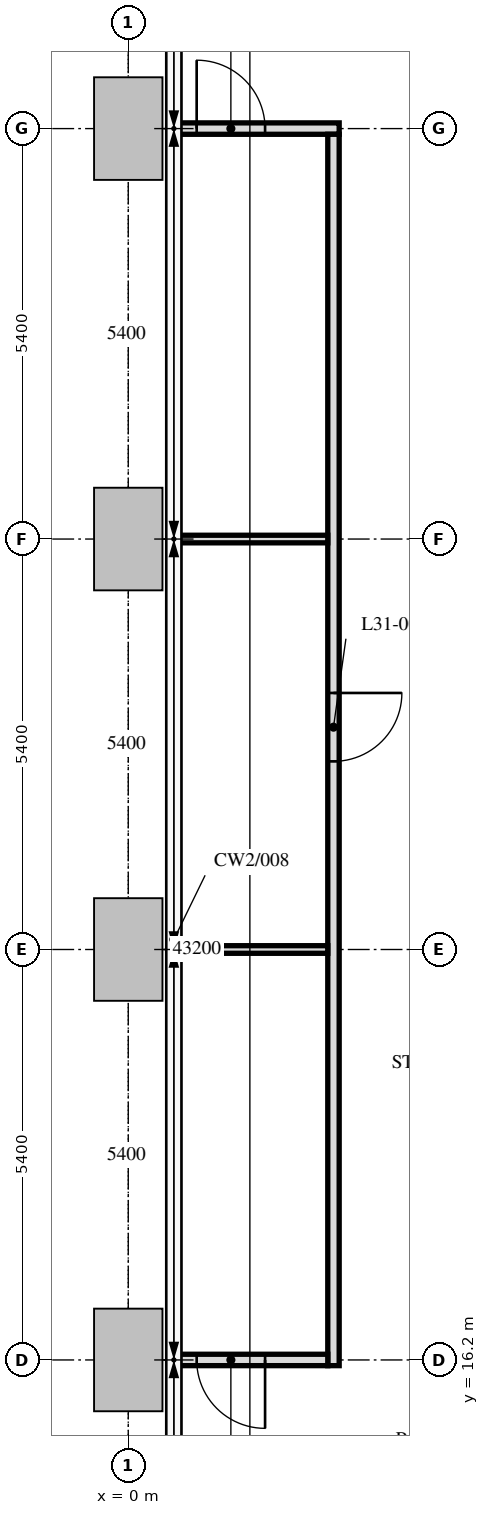
"""IFC4 building model, lengths in metres.
Left out: names, types, materials, properties, quantities, classifications, styles, units other than length and angle.
Written with IfcOpenShell. Run it as: python <this file> out.ifc"""

import sys

from ifc_helpers import new_model, si_unit, direction, frame, frame_2d, origin, place, context, subcontext, project, spatial, rectangle, extrude, element, fill, save


model = new_model("IFC4")
c1 = context("Model", 3, precision=1e-05, world=origin(), true_north=direction((0.0, 1.0)))
c2 = subcontext(c1, "Body", "Model", "MODEL_VIEW")
j1 = project(units=[si_unit("LENGTHUNIT", "METRE"), si_unit("PLANEANGLEUNIT", "RADIAN")], contexts=[c1])
p1 = place(None, origin())
s1 = spatial("IfcSite", under=j1, at=p1, CompositionType="ELEMENT")
p2 = place(p1, origin())
s2 = spatial("IfcBuilding", under=s1, at=p2, CompositionType="ELEMENT")
p3 = place(p2, frame((0.0, 0.0, 130.6)))
s3 = spatial("IfcBuildingStorey", under=s2, at=p3, CompositionType="ELEMENT", Elevation=130.6)
p4 = place(p3, frame((0.6, 32.4, 0.0), z_axis=(0.0, 0.0, 1.0), x_axis=(1.0, 0.0, 0.0)))
e1 = element("IfcWall", 1, at=p4, inside=s3, PredefinedType="PARTITIONING", context=c2, shape_type="SweptSolid", body=[
    extrude(rectangle(XDim=2.175, YDim=0.15, at=frame_2d((1.087, 0.0))), origin(), (0.0, 0.0, 1.0), 6.75),
])
p5 = place(p4, frame((0.3, 0.0, 0.0)))
e2 = element("IfcOpeningElement", 2, at=p5, cuts=e1, PredefinedType="OPENING", context=c2, shape_type="SweptSolid", body=[
    extrude(rectangle(XDim=0.9, YDim=2.1, at=frame_2d((0.45, 1.05))), frame((0.0, 0.075, 0.0), z_axis=(0.0, -1.0, 0.0), x_axis=(1.0, 0.0, 0.0)), (0.0, 0.0, 1.0), 0.15),
])
p6 = place(p3, frame((2.7, 32.325, 0.0), z_axis=(0.0, 0.0, 1.0), x_axis=(0.0, -1.0, 0.0)))
e3 = element("IfcWall", 3, at=p6, inside=s3, PredefinedType="PARTITIONING", context=c2, shape_type="SweptSolid", body=[
    extrude(rectangle(XDim=16.2, YDim=0.15, at=frame_2d((8.1, 0.0))), origin(), (0.0, 0.0, 1.0), 6.75),
])
p7 = place(p6, frame((7.35, 0.0, 0.0)))
e4 = element("IfcOpeningElement", 4, at=p7, cuts=e3, PredefinedType="OPENING", context=c2, shape_type="SweptSolid", body=[
    extrude(rectangle(XDim=0.9, YDim=2.1, at=frame_2d((0.45, 1.05))), frame((0.0, 0.075, 0.0), z_axis=(0.0, -1.0, 0.0), x_axis=(1.0, 0.0, 0.0)), (0.0, 0.0, 1.0), 0.15),
])
p8 = place(p3, frame((2.625, 16.2, 0.0), z_axis=(0.0, 0.0, 1.0), x_axis=(-1.0, 0.0, 0.0)))
e5 = element("IfcWall", 5, at=p8, inside=s3, PredefinedType="PARTITIONING", context=c2, shape_type="SweptSolid", body=[
    extrude(rectangle(XDim=2.025, YDim=0.15, at=frame_2d((1.012, 0.0))), origin(), (0.0, 0.0, 1.0), 7.5),
])
p9 = place(p8, frame((0.825, 0.0, 0.0)))
e6 = element("IfcOpeningElement", 6, at=p9, cuts=e5, PredefinedType="OPENING", context=c2, shape_type="SweptSolid", body=[
    extrude(rectangle(XDim=0.9, YDim=2.1, at=frame_2d((0.45, 1.05))), frame((0.0, 0.075, 0.0), z_axis=(0.0, -1.0, 0.0), x_axis=(1.0, 0.0, 0.0)), (0.0, 0.0, 1.0), 0.15),
])
for number, where, z_axis, x_axis in (
    (7, (2.625, 21.6, 0.0), (0.0, 0.0, 1.0), (-1.0, 0.0, 0.0)),
    (8, (2.625, 27.0, 0.0), (0.0, 0.0, 1.0), (-1.0, 0.0, 0.0)),
):
    element("IfcWall", number, at=place(p3, frame(where, z_axis=z_axis, x_axis=x_axis)), inside=s3, PredefinedType="PARTITIONING", context=c2, shape_type="SweptSolid", body=[
        extrude(rectangle(XDim=2.025, YDim=0.1, at=frame_2d((1.012, 0.0))), origin(), (0.0, 0.0, 1.0), 7.5),
    ])
p10 = place(p9, origin())
e9 = element("IfcDoor", 9, at=p10, inside=s3, OperationType="SINGLE_SWING_RIGHT", PredefinedType="DOOR", context=c2, shape_type="SweptSolid", body=[
    extrude(rectangle(XDim=0.9, YDim=2.1, at=frame_2d((0.45, 1.05))), frame((0.0, 0.025, 0.0), z_axis=(0.0, -1.0, 0.0), x_axis=(1.0, 0.0, 0.0)), (0.0, 0.0, 1.0), 0.05),
])
fill(e6, e9)
p11 = place(p7, origin())
e10 = element("IfcDoor", 10, at=p11, inside=s3, OperationType="SINGLE_SWING_RIGHT", PredefinedType="DOOR", context=c2, shape_type="SweptSolid", body=[
    extrude(rectangle(XDim=0.9, YDim=2.1, at=frame_2d((0.45, 1.05))), frame((0.0, 0.025, 0.0), z_axis=(0.0, -1.0, 0.0), x_axis=(1.0, 0.0, 0.0)), (0.0, 0.0, 1.0), 0.05),
])
fill(e4, e10)
p12 = place(p5, origin())
e11 = element("IfcDoor", 11, at=p12, inside=s3, OperationType="SINGLE_SWING_RIGHT", PredefinedType="DOOR", context=c2, shape_type="SweptSolid", body=[
    extrude(rectangle(XDim=0.9, YDim=2.1, at=frame_2d((0.45, 1.05))), frame((0.0, 0.025, 0.0), z_axis=(0.0, -1.0, 0.0), x_axis=(1.0, 0.0, 0.0)), (0.0, 0.0, 1.0), 0.05),
])
fill(e2, e11)
save(model, sys.argv[1])
